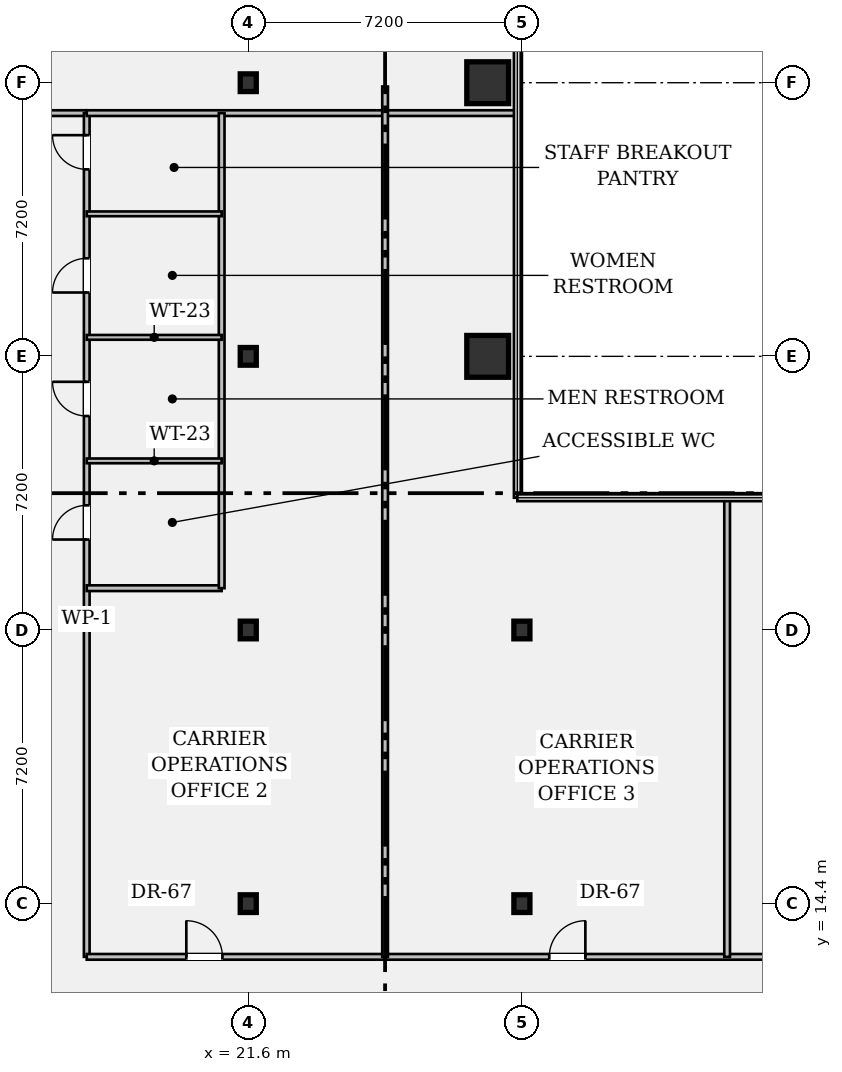
"""IFC4 building model, lengths in metres.
Left out: names, types, materials, properties, quantities, classifications, styles, units other than length and angle.
Written with IfcOpenShell. Run it as: python <this file> out.ifc"""

import sys

from ifc_helpers import new_model, si_unit, direction, frame, frame_2d, origin, origin_2d, place, context, subcontext, project, spatial, rectangle, hollow_rectangle, i_section, extrude, element, fill, save


model = new_model("IFC4")
c1 = context("Model", 3, precision=1e-05, world=origin(), true_north=direction((0.0, 1.0)))
c2 = subcontext(c1, "Body", "Model", "MODEL_VIEW")
j1 = project(units=[si_unit("LENGTHUNIT", "METRE"), si_unit("PLANEANGLEUNIT", "RADIAN")], contexts=[c1])
p1 = place(None, origin())
s1 = spatial("IfcSite", under=j1, at=p1, CompositionType="ELEMENT")
p2 = place(p1, origin())
s2 = spatial("IfcBuilding", under=s1, at=p2, CompositionType="ELEMENT")
p3 = place(p2, frame((0.0, 0.0, 38.85)))
s3 = spatial("IfcBuildingStorey", under=s2, at=p3, CompositionType="ELEMENT", Elevation=38.85)
for number, where, z_axis, x_axis in (
    (1, (21.6, 14.4, 0.0), (0.0, 0.0, 1.0), (1.0, 0.0, 0.0)),
    (2, (21.6, 21.6, 0.0), (0.0, 0.0, 1.0), (1.0, 0.0, 0.0)),
    (3, (21.6, 28.8, 0.0), (0.0, 0.0, 1.0), (1.0, 0.0, 0.0)),
    (4, (21.6, 36.0, 0.0), (0.0, 0.0, 1.0), (1.0, 0.0, 0.0)),
):
    element("IfcColumn", number, at=place(p3, frame(where, z_axis=z_axis, x_axis=x_axis)), inside=s3, PredefinedType="COLUMN", context=c2, shape_type="SweptSolid", body=[
        extrude(i_section(OverallWidth=0.422, OverallDepth=0.465, WebThickness=0.045, FlangeThickness=0.073, FilletRadius=0.018, at=origin_2d()), origin(), (0.0, 0.0, 1.0), 3.57),
    ])
for number, where, z_axis, x_axis in (
    (5, (27.9, 28.8, 0.0), (0.0, 0.0, 1.0), (1.0, 0.0, 0.0)),
    (6, (27.9, 36.0, 0.0), (0.0, 0.0, 1.0), (1.0, 0.0, 0.0)),
):
    element("IfcColumn", number, at=place(p3, frame(where, z_axis=z_axis, x_axis=x_axis)), inside=s3, PredefinedType="COLUMN", context=c2, shape_type="SweptSolid", body=[
        extrude(hollow_rectangle(XDim=1.1, YDim=1.1, WallThickness=0.07, at=origin_2d()), origin(), (0.0, 0.0, 1.0), 3.57),
    ])
for number, where, z_axis, x_axis in (
    (7, (28.8, 14.4, 0.0), (0.0, 0.0, 1.0), (1.0, 0.0, 0.0)),
    (8, (28.8, 21.6, 0.0), (0.0, 0.0, 1.0), (1.0, 0.0, 0.0)),
):
    element("IfcColumn", number, at=place(p3, frame(where, z_axis=z_axis, x_axis=x_axis)), inside=s3, PredefinedType="COLUMN", context=c2, shape_type="SweptSolid", body=[
        extrude(i_section(OverallWidth=0.422, OverallDepth=0.465, WebThickness=0.045, FlangeThickness=0.073, FilletRadius=0.018, at=origin_2d()), origin(), (0.0, 0.0, 1.0), 3.57),
    ])
p4 = place(p3, frame((14.4, 35.2, 0.0), z_axis=(0.0, 0.0, 1.0), x_axis=(1.0, 0.0, 0.0)))
e9 = element("IfcWall", 9, at=p4, inside=s3, PredefinedType="PARTITIONING", context=c2, shape_type="SweptSolid", body=[
    extrude(rectangle(XDim=2.95, YDim=0.15, at=frame_2d((1.475, 0.0))), origin(), (0.0, 0.0, 1.0), 2.628),
])
p5 = place(p4, frame((0.95, 0.0, 0.0)))
e10 = element("IfcOpeningElement", 10, at=p5, cuts=e9, PredefinedType="OPENING", context=c2, shape_type="SweptSolid", body=[
    extrude(rectangle(XDim=1.0, YDim=2.15, at=frame_2d((0.5, 1.075))), frame((0.0, 0.087, 0.0), z_axis=(0.0, -1.0, 0.0), x_axis=(1.0, 0.0, 0.0)), (0.0, 0.0, 1.0), 0.174),
])
p6 = place(p3, frame((17.35, 13.0, 0.0), z_axis=(0.0, 0.0, 1.0), x_axis=(0.0, 1.0, 0.0)))
e11 = element("IfcWall", 11, at=p6, inside=s3, PredefinedType="PARTITIONING", context=c2, shape_type="SweptSolid", body=[
    extrude(rectangle(XDim=22.2, YDim=0.15, at=frame_2d((11.1, 0.0))), origin(), (0.0, 0.0, 1.0), 2.628),
])
p7 = place(p6, frame((10.98, 0.0, 0.0)))
e12 = element("IfcOpeningElement", 12, at=p7, cuts=e11, PredefinedType="OPENING", context=c2, shape_type="SweptSolid", body=[
    extrude(rectangle(XDim=0.9, YDim=2.15, at=frame_2d((0.45, 1.075))), frame((0.0, 0.087, 0.0), z_axis=(0.0, -1.0, 0.0), x_axis=(1.0, 0.0, 0.0)), (0.0, 0.0, 1.0), 0.174),
])
p8 = place(p6, frame((14.23, 0.0, 0.0)))
e13 = element("IfcOpeningElement", 13, at=p8, cuts=e11, PredefinedType="OPENING", context=c2, shape_type="SweptSolid", body=[
    extrude(rectangle(XDim=0.9, YDim=2.15, at=frame_2d((0.45, 1.075))), frame((0.0, 0.087, 0.0), z_axis=(0.0, -1.0, 0.0), x_axis=(1.0, 0.0, 0.0)), (0.0, 0.0, 1.0), 0.174),
])
p9 = place(p6, frame((17.48, 0.0, 0.0)))
e14 = element("IfcOpeningElement", 14, at=p9, cuts=e11, PredefinedType="OPENING", context=c2, shape_type="SweptSolid", body=[
    extrude(rectangle(XDim=0.9, YDim=2.15, at=frame_2d((0.45, 1.075))), frame((0.0, 0.087, 0.0), z_axis=(0.0, -1.0, 0.0), x_axis=(1.0, 0.0, 0.0)), (0.0, 0.0, 1.0), 0.174),
])
p10 = place(p6, frame((20.72, 0.0, 0.0)))
e15 = element("IfcOpeningElement", 15, at=p10, cuts=e11, PredefinedType="OPENING", context=c2, shape_type="SweptSolid", body=[
    extrude(rectangle(XDim=0.9, YDim=2.15, at=frame_2d((0.45, 1.075))), frame((0.0, 0.087, 0.0), z_axis=(0.0, -1.0, 0.0), x_axis=(1.0, 0.0, 0.0)), (0.0, 0.0, 1.0), 0.174),
])
p11 = place(p3, frame((17.35, 13.0, 0.0), z_axis=(0.0, 0.0, 1.0), x_axis=(1.0, 0.0, 0.0)))
e16 = element("IfcWall", 16, at=p11, inside=s3, PredefinedType="PARTITIONING", context=c2, shape_type="SweptSolid", body=[
    extrude(rectangle(XDim=25.25, YDim=0.15, at=frame_2d((12.625, 0.0))), origin(), (0.0, 0.0, 1.0), 2.628),
])
p12 = place(p11, frame((2.62, 0.0, 0.0)))
e17 = element("IfcOpeningElement", 17, at=p12, cuts=e16, PredefinedType="OPENING", context=c2, shape_type="SweptSolid", body=[
    extrude(rectangle(XDim=0.95, YDim=2.15, at=frame_2d((0.475, 1.075))), frame((0.0, 0.087, 0.0), z_axis=(0.0, -1.0, 0.0), x_axis=(1.0, 0.0, 0.0)), (0.0, 0.0, 1.0), 0.174),
])
p13 = place(p11, frame((12.17, 0.0, 0.0)))
e18 = element("IfcOpeningElement", 18, at=p13, cuts=e16, PredefinedType="OPENING", context=c2, shape_type="SweptSolid", body=[
    extrude(rectangle(XDim=0.95, YDim=2.15, at=frame_2d((0.475, 1.075))), frame((0.0, 0.087, 0.0), z_axis=(0.0, -1.0, 0.0), x_axis=(1.0, 0.0, 0.0)), (0.0, 0.0, 1.0), 0.174),
])
p14 = place(p11, frame((20.55, 0.0, 0.0)))
e19 = element("IfcOpeningElement", 19, at=p14, cuts=e16, PredefinedType="OPENING", context=c2, shape_type="SweptSolid", body=[
    extrude(rectangle(XDim=0.95, YDim=2.15, at=frame_2d((0.475, 1.075))), frame((0.0, 0.087, 0.0), z_axis=(0.0, -1.0, 0.0), x_axis=(1.0, 0.0, 0.0)), (0.0, 0.0, 1.0), 0.174),
])
p15 = place(p3, frame((17.35, 35.2, 0.0), z_axis=(0.0, 0.0, 1.0), x_axis=(1.0, 0.0, 0.0)))
e20 = element("IfcWall", 20, at=p15, inside=s3, PredefinedType="PARTITIONING", context=c2, shape_type="SweptSolid", body=[
    extrude(rectangle(XDim=11.33, YDim=0.15, at=frame_2d((5.665, 0.0))), origin(), (0.0, 0.0, 1.0), 2.628),
])
p16 = place(p3, frame((17.35, 22.7, 0.0), z_axis=(0.0, 0.0, 1.0), x_axis=(1.0, 0.0, 0.0)))
e21 = element("IfcWall", 21, at=p16, inside=s3, PredefinedType="PARTITIONING", context=c2, shape_type="SweptSolid", body=[
    extrude(rectangle(XDim=3.55, YDim=0.15, at=frame_2d((1.775, 0.0))), origin(), (0.0, 0.0, 1.0), 3.088),
])
p17 = place(p3, frame((20.9, 22.7, 0.0), z_axis=(0.0, 0.0, 1.0), x_axis=(0.0, 1.0, 0.0)))
e22 = element("IfcWall", 22, at=p17, inside=s3, PredefinedType="PARTITIONING", context=c2, shape_type="SweptSolid", body=[
    extrude(rectangle(XDim=12.5, YDim=0.15, at=frame_2d((6.25, 0.0))), origin(), (0.0, 0.0, 1.0), 2.628),
])
for number, where, z_axis, x_axis in (
    (23, (17.35, 26.05, 0.0), (0.0, 0.0, 1.0), (1.0, 0.0, 0.0)),
    (24, (17.35, 29.3, 0.0), (0.0, 0.0, 1.0), (1.0, 0.0, 0.0)),
    (25, (17.35, 32.55, 0.0), (0.0, 0.0, 1.0), (1.0, 0.0, 0.0)),
):
    element("IfcWall", number, at=place(p3, frame(where, z_axis=z_axis, x_axis=x_axis)), inside=s3, PredefinedType="PARTITIONING", context=c2, shape_type="SweptSolid", body=[
        extrude(rectangle(XDim=3.55, YDim=0.125, at=frame_2d((1.775, 0.0))), origin(), (0.0, 0.0, 1.0), 3.088),
    ])
p18 = place(p3, frame((25.2, 13.0, 0.0), z_axis=(0.0, 0.0, 1.0), x_axis=(0.0, 1.0, 0.0)))
e26 = element("IfcWall", 26, at=p18, inside=s3, PredefinedType="PARTITIONING", context=c2, shape_type="SweptSolid", body=[
    extrude(rectangle(XDim=22.9, YDim=0.15, at=frame_2d((11.45, 0.0))), origin(), (0.0, 0.0, 1.0), 2.628),
])
p19 = place(p3, frame((34.2, 13.0, 0.0), z_axis=(0.0, 0.0, 1.0), x_axis=(0.0, 1.0, 0.0)))
e27 = element("IfcWall", 27, at=p19, inside=s3, PredefinedType="PARTITIONING", context=c2, shape_type="SweptSolid", body=[
    extrude(rectangle(XDim=12.05, YDim=0.15, at=frame_2d((6.025, 0.0))), origin(), (0.0, 0.0, 1.0), 2.628),
])
p20 = place(p7, origin())
e28 = element("IfcDoor", 28, at=p20, inside=s3, OperationType="SINGLE_SWING_LEFT", PredefinedType="DOOR", context=c2, shape_type="SweptSolid", body=[
    extrude(rectangle(XDim=0.9, YDim=2.15, at=frame_2d((0.45, 1.075))), frame((0.0, 0.025, 0.0), z_axis=(0.0, -1.0, 0.0), x_axis=(1.0, 0.0, 0.0)), (0.0, 0.0, 1.0), 0.05),
])
fill(e12, e28)
p21 = place(p8, origin())
e29 = element("IfcDoor", 29, at=p21, inside=s3, OperationType="SINGLE_SWING_RIGHT", PredefinedType="DOOR", context=c2, shape_type="SweptSolid", body=[
    extrude(rectangle(XDim=0.9, YDim=2.15, at=frame_2d((0.45, 1.075))), frame((0.0, 0.025, 0.0), z_axis=(0.0, -1.0, 0.0), x_axis=(1.0, 0.0, 0.0)), (0.0, 0.0, 1.0), 0.05),
])
fill(e13, e29)
p22 = place(p9, origin())
e30 = element("IfcDoor", 30, at=p22, inside=s3, OperationType="SINGLE_SWING_LEFT", PredefinedType="DOOR", context=c2, shape_type="SweptSolid", body=[
    extrude(rectangle(XDim=0.9, YDim=2.15, at=frame_2d((0.45, 1.075))), frame((0.0, 0.025, 0.0), z_axis=(0.0, -1.0, 0.0), x_axis=(1.0, 0.0, 0.0)), (0.0, 0.0, 1.0), 0.05),
])
fill(e14, e30)
p23 = place(p10, origin())
e31 = element("IfcDoor", 31, at=p23, inside=s3, OperationType="SINGLE_SWING_RIGHT", PredefinedType="DOOR", context=c2, shape_type="SweptSolid", body=[
    extrude(rectangle(XDim=0.9, YDim=2.15, at=frame_2d((0.45, 1.075))), frame((0.0, 0.025, 0.0), z_axis=(0.0, -1.0, 0.0), x_axis=(1.0, 0.0, 0.0)), (0.0, 0.0, 1.0), 0.05),
])
fill(e15, e31)
p24 = place(p12, origin())
e32 = element("IfcDoor", 32, at=p24, inside=s3, OperationType="SINGLE_SWING_LEFT", PredefinedType="DOOR", context=c2, shape_type="SweptSolid", body=[
    extrude(rectangle(XDim=0.95, YDim=2.15, at=frame_2d((0.475, 1.075))), frame((0.0, 0.025, 0.0), z_axis=(0.0, -1.0, 0.0), x_axis=(1.0, 0.0, 0.0)), (0.0, 0.0, 1.0), 0.05),
])
fill(e17, e32)
p25 = place(p13, origin())
e33 = element("IfcDoor", 33, at=p25, inside=s3, OperationType="SINGLE_SWING_RIGHT", PredefinedType="DOOR", context=c2, shape_type="SweptSolid", body=[
    extrude(rectangle(XDim=0.95, YDim=2.15, at=frame_2d((0.475, 1.075))), frame((0.0, 0.025, 0.0), z_axis=(0.0, -1.0, 0.0), x_axis=(1.0, 0.0, 0.0)), (0.0, 0.0, 1.0), 0.05),
])
fill(e18, e33)
save(model, sys.argv[1])
